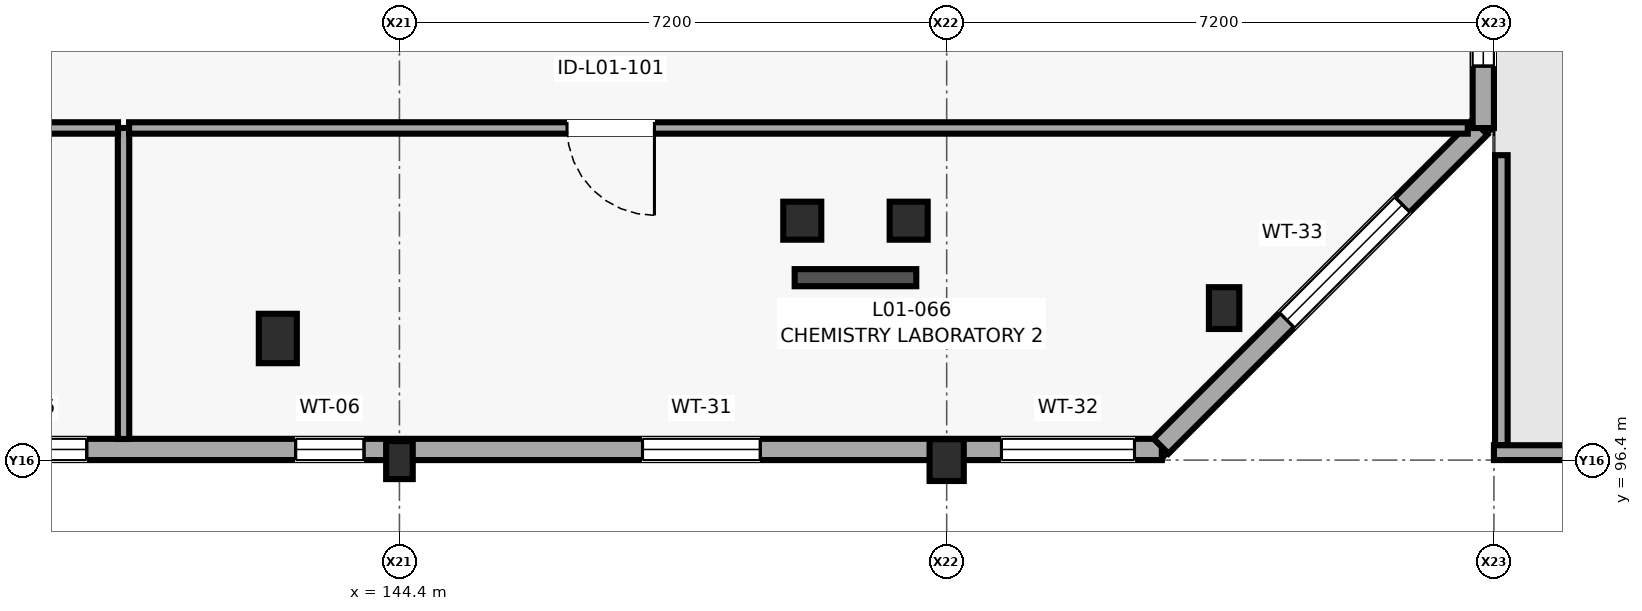
"""IFC4 building model, lengths in metres.
Left out: names, types, materials, properties, quantities, classifications, styles, units other than length and angle.
Written with IfcOpenShell. Run it as: python <this file> out.ifc"""

import sys

from ifc_helpers import new_model, si_unit, direction, frame, frame_2d, origin, origin_2d, place, context, subcontext, project, spatial, rectangle, extrude, element, fill, save


model = new_model("IFC4")
c1 = context("Model", 3, precision=1e-05, world=origin(), true_north=direction((0.0, 1.0)))
c2 = subcontext(c1, "Body", "Model", "MODEL_VIEW")
j1 = project(units=[si_unit("LENGTHUNIT", "METRE"), si_unit("PLANEANGLEUNIT", "RADIAN")], contexts=[c1])
p1 = place(None, origin())
s1 = spatial("IfcSite", under=j1, at=p1, CompositionType="ELEMENT")
p2 = place(p1, origin())
s2 = spatial("IfcBuilding", under=s1, at=p2, CompositionType="ELEMENT")
p3 = place(p2, frame((0.0, 0.0, 4.2)))
s3 = spatial("IfcBuildingStorey", under=s2, at=p3, CompositionType="ELEMENT", Elevation=4.2)
p4 = place(p3, frame((142.8, 98.0, 0.0), z_axis=(0.0, 0.0, 1.0), x_axis=(1.0, 0.0, 0.0)))
e1 = element("IfcColumn", 1, at=p4, inside=s3, PredefinedType="COLUMN", context=c2, shape_type="SweptSolid", body=[
    extrude(rectangle(XDim=0.5, YDim=0.65, at=origin_2d()), origin(), (0.0, 0.0, 1.0), 4.0),
])
p5 = place(p3, frame((144.4, 96.4, 0.0), z_axis=(0.0, 0.0, 1.0), x_axis=(1.0, 0.0, 0.0)))
e2 = element("IfcColumn", 2, at=p5, inside=s3, PredefinedType="PILASTER", context=c2, shape_type="SweptSolid", body=[
    extrude(rectangle(XDim=0.35, YDim=0.5, at=origin_2d()), origin(), (0.0, 0.0, 1.0), 4.0),
])
for number, where, z_axis, x_axis in (
    (3, (149.7, 99.55, 0.0), (0.0, 0.0, 1.0), (1.0, 0.0, 0.0)),
    (4, (151.1, 99.55, 0.0), (0.0, 0.0, 1.0), (1.0, 0.0, 0.0)),
):
    element("IfcColumn", number, at=place(p3, frame(where, z_axis=z_axis, x_axis=x_axis)), inside=s3, PredefinedType="COLUMN", context=c2, shape_type="SweptSolid", body=[
        extrude(rectangle(XDim=0.5, YDim=0.5, at=origin_2d()), origin(), (0.0, 0.0, 1.0), 4.0),
    ])
p6 = place(p3, frame((151.6, 96.4, 0.0), z_axis=(0.0, 0.0, 1.0), x_axis=(1.0, 0.0, 0.0)))
e5 = element("IfcColumn", 5, at=p6, inside=s3, PredefinedType="PILASTER", context=c2, shape_type="SweptSolid", body=[
    extrude(rectangle(XDim=0.45, YDim=0.55, at=origin_2d()), origin(), (0.0, 0.0, 1.0), 4.0),
])
p7 = place(p3, frame((155.25, 98.4, 0.0), z_axis=(0.0, 0.0, 1.0), x_axis=(1.0, 0.0, 0.0)))
e6 = element("IfcColumn", 6, at=p7, inside=s3, PredefinedType="COLUMN", context=c2, shape_type="SweptSolid", body=[
    extrude(rectangle(XDim=0.4, YDim=0.55, at=origin_2d()), origin(), (0.0, 0.0, 1.0), 4.0),
])
p8 = place(p3, frame((138.276, 96.54, 0.0), z_axis=(0.0, 0.0, 1.0), x_axis=(1.0, 0.0, 0.0)))
e7 = element("IfcWall", 7, at=p8, inside=s3, PredefinedType="SOLIDWALL", context=c2, shape_type="SweptSolid", body=[
    extrude(rectangle(XDim=16.155, YDim=0.28, at=frame_2d((8.078, 0.0))), origin(), (0.0, 0.0, 1.0), 3.015),
])
p9 = place(p8, frame((0.36, 0.0, 0.85)))
e8 = element("IfcOpeningElement", 8, at=p9, cuts=e7, PredefinedType="OPENING", context=c2, shape_type="SweptSolid", body=[
    extrude(rectangle(XDim=1.65, YDim=1.95, at=frame_2d((0.825, 0.975))), frame((0.0, 0.15, 0.0), z_axis=(0.0, -1.0, 0.0), x_axis=(1.0, 0.0, 0.0)), (0.0, 0.0, 1.0), 0.3),
])
p10 = place(p8, frame((4.758, 0.0, 1.05)))
e9 = element("IfcOpeningElement", 9, at=p10, cuts=e7, PredefinedType="OPENING", context=c2, shape_type="SweptSolid", body=[
    extrude(rectangle(XDim=0.9, YDim=1.5, at=frame_2d((0.45, 0.75))), frame((0.0, 0.15, 0.0), z_axis=(0.0, -1.0, 0.0), x_axis=(1.0, 0.0, 0.0)), (0.0, 0.0, 1.0), 0.3),
])
p11 = place(p8, frame((9.322, 0.0, 0.85)))
e10 = element("IfcOpeningElement", 10, at=p11, cuts=e7, PredefinedType="OPENING", context=c2, shape_type="SweptSolid", body=[
    extrude(rectangle(XDim=1.55, YDim=1.85, at=frame_2d((0.775, 0.925))), frame((0.0, 0.15, 0.0), z_axis=(0.0, -1.0, 0.0), x_axis=(1.0, 0.0, 0.0)), (0.0, 0.0, 1.0), 0.3),
])
p12 = place(p8, frame((14.045, 0.0, 0.75)))
e11 = element("IfcOpeningElement", 11, at=p12, cuts=e7, PredefinedType="OPENING", context=c2, shape_type="SweptSolid", body=[
    extrude(rectangle(XDim=1.75, YDim=2.05, at=frame_2d((0.875, 1.025))), frame((0.0, 0.15, 0.0), z_axis=(0.0, -1.0, 0.0), x_axis=(1.0, 0.0, 0.0)), (0.0, 0.0, 1.0), 0.3),
])
p13 = place(p3, frame((154.419, 96.584, 0.0), z_axis=(0.0, 0.0, 1.0), x_axis=(0.707106781187, 0.707106781187, 0.0)))
e12 = element("IfcWall", 12, at=p13, inside=s3, PredefinedType="SOLIDWALL", context=c2, shape_type="SweptSolid", body=[
    extrude(rectangle(XDim=5.936, YDim=0.28, at=frame_2d((2.968, 0.0))), origin(), (0.0, 0.0, 1.0), 3.78),
])
p14 = place(p13, frame((2.343, 0.0, 0.85)))
e13 = element("IfcOpeningElement", 13, at=p14, cuts=e12, PredefinedType="OPENING", context=c2, shape_type="SweptSolid", body=[
    extrude(rectangle(XDim=2.15, YDim=1.95, at=frame_2d((1.075, 0.975))), frame((0.0, 0.15, 0.0), z_axis=(0.0, -1.0, 0.0), x_axis=(1.0, 0.0, 0.0)), (0.0, 0.0, 1.0), 0.3),
])
p15 = place(p3, frame((158.66, 100.769, 0.0), z_axis=(0.0, 0.0, 1.0), x_axis=(0.0, 1.0, 0.0)))
e14 = element("IfcWall", 14, at=p15, inside=s3, PredefinedType="SOLIDWALL", context=c2, shape_type="SweptSolid", body=[
    extrude(rectangle(XDim=6.862, YDim=0.28, at=frame_2d((3.431, 0.0))), origin(), (0.0, 0.0, 1.0), 3.78),
])
p16 = place(p15, frame((0.815, 0.0, 0.85)))
e15 = element("IfcOpeningElement", 15, at=p16, cuts=e14, PredefinedType="OPENING", context=c2, shape_type="SweptSolid", body=[
    extrude(rectangle(XDim=1.8, YDim=1.8, at=frame_2d((0.9, 0.9))), frame((0.0, 0.15, 0.0), z_axis=(0.0, -1.0, 0.0), x_axis=(1.0, 0.0, 0.0)), (0.0, 0.0, 1.0), 0.3),
])
p17 = place(p15, frame((4.096, 0.0, 0.85)))
e16 = element("IfcOpeningElement", 16, at=p17, cuts=e14, PredefinedType="OPENING", context=c2, shape_type="SweptSolid", body=[
    extrude(rectangle(XDim=2.1, YDim=1.8, at=frame_2d((1.05, 0.9))), frame((0.0, 0.15, 0.0), z_axis=(0.0, -1.0, 0.0), x_axis=(1.0, 0.0, 0.0)), (0.0, 0.0, 1.0), 0.3),
])
p18 = place(p3, frame((158.898, 100.412, 0.0), z_axis=(0.0, 0.0, 1.0), x_axis=(0.0, -1.0, 0.0)))
e17 = element("IfcWall", 17, at=p18, inside=s3, PredefinedType="PARAPET", context=c2, shape_type="SweptSolid", body=[
    extrude(rectangle(XDim=3.816, YDim=0.165, at=frame_2d((1.908, 0.0))), origin(), (0.0, 0.0, 1.0), 1.12),
])
p19 = place(p3, frame((158.8, 96.498, 0.0), z_axis=(0.0, 0.0, 1.0), x_axis=(1.0, 0.0, 0.0)))
e18 = element("IfcWall", 18, at=p19, inside=s3, PredefinedType="PARAPET", context=c2, shape_type="SweptSolid", body=[
    extrude(rectangle(XDim=5.244, YDim=0.195, at=frame_2d((2.622, 0.0))), origin(), (0.0, 0.0, 1.0), 1.12),
])
p20 = place(p3, frame((149.6, 98.8, 0.0), z_axis=(0.0, 0.0, 1.0), x_axis=(1.0, 0.0, 0.0)))
e19 = element("IfcWall", 19, at=p20, inside=s3, PredefinedType="SHEAR", context=c2, shape_type="SweptSolid", body=[
    extrude(rectangle(XDim=1.6, YDim=0.225, at=frame_2d((0.8, 0.0))), origin(), (0.0, 0.0, 1.0), 3.72),
])
p21 = place(p3, frame((140.77, 96.678, 0.0), z_axis=(0.0, 0.0, 1.0), x_axis=(0.0, 1.0, 0.0)))
e20 = element("IfcWall", 20, at=p21, inside=s3, PredefinedType="PARTITIONING", context=c2, shape_type="SweptSolid", body=[
    extrude(rectangle(XDim=4.092, YDim=0.15, at=frame_2d((2.046, 0.0))), origin(), (0.0, 0.0, 1.0), 3.715),
])
p22 = place(p3, frame((140.697, 100.77, 0.0), z_axis=(0.0, 0.0, 1.0), x_axis=(-1.0, 0.0, 0.0)))
e21 = element("IfcWall", 21, at=p22, inside=s3, PredefinedType="PARTITIONING", context=c2, shape_type="SweptSolid", body=[
    extrude(rectangle(XDim=17.854, YDim=0.15, at=frame_2d((8.927, 0.0))), origin(), (0.0, 0.0, 1.0), 3.715),
])
p23 = place(p22, frame((8.352, 0.0, 0.0)))
e22 = element("IfcOpeningElement", 22, at=p23, cuts=e21, PredefinedType="OPENING", context=c2, shape_type="SweptSolid", body=[
    extrude(rectangle(XDim=1.15, YDim=2.2, at=frame_2d((0.575, 1.1))), frame((0.0, 0.085, 0.0), z_axis=(0.0, -1.0, 0.0), x_axis=(1.0, 0.0, 0.0)), (0.0, 0.0, 1.0), 0.17),
])
p24 = place(p3, frame((158.456, 100.77, 0.0), z_axis=(0.0, 0.0, 1.0), x_axis=(-1.0, 0.0, 0.0)))
e23 = element("IfcWall", 23, at=p24, inside=s3, PredefinedType="PARTITIONING", context=c2, shape_type="SweptSolid", body=[
    extrude(rectangle(XDim=17.613, YDim=0.15, at=frame_2d((8.807, 0.0))), origin(), (0.0, 0.0, 1.0), 3.715),
])
p25 = place(p24, frame((10.701, 0.0, 0.0)))
e24 = element("IfcOpeningElement", 24, at=p25, cuts=e23, PredefinedType="OPENING", context=c2, shape_type="SweptSolid", body=[
    extrude(rectangle(XDim=1.15, YDim=2.2, at=frame_2d((0.575, 1.1))), frame((0.0, 0.085, 0.0), z_axis=(0.0, -1.0, 0.0), x_axis=(1.0, 0.0, 0.0)), (0.0, 0.0, 1.0), 0.17),
])
p26 = place(p9, origin())
e25 = element("IfcWindow", 25, at=p26, inside=s3, PartitioningType="SINGLE_PANEL", PredefinedType="WINDOW", context=c2, shape_type="SweptSolid", body=[
    extrude(rectangle(XDim=1.65, YDim=1.95, at=frame_2d((0.825, 0.975))), frame((0.0, 0.03, 0.0), z_axis=(0.0, -1.0, 0.0), x_axis=(1.0, 0.0, 0.0)), (0.0, 0.0, 1.0), 0.06),
])
fill(e8, e25)
p27 = place(p10, origin())
e26 = element("IfcWindow", 26, at=p27, inside=s3, PartitioningType="SINGLE_PANEL", PredefinedType="WINDOW", context=c2, shape_type="SweptSolid", body=[
    extrude(rectangle(XDim=0.9, YDim=1.5, at=frame_2d((0.45, 0.75))), frame((0.0, 0.03, 0.0), z_axis=(0.0, -1.0, 0.0), x_axis=(1.0, 0.0, 0.0)), (0.0, 0.0, 1.0), 0.06),
])
fill(e9, e26)
p28 = place(p11, origin())
e27 = element("IfcWindow", 27, at=p28, inside=s3, PartitioningType="SINGLE_PANEL", PredefinedType="WINDOW", context=c2, shape_type="SweptSolid", body=[
    extrude(rectangle(XDim=1.55, YDim=1.85, at=frame_2d((0.775, 0.925))), frame((0.0, 0.03, 0.0), z_axis=(0.0, -1.0, 0.0), x_axis=(1.0, 0.0, 0.0)), (0.0, 0.0, 1.0), 0.06),
])
fill(e10, e27)
p29 = place(p12, origin())
e28 = element("IfcWindow", 28, at=p29, inside=s3, PartitioningType="SINGLE_PANEL", PredefinedType="WINDOW", context=c2, shape_type="SweptSolid", body=[
    extrude(rectangle(XDim=1.75, YDim=2.05, at=frame_2d((0.875, 1.025))), frame((0.0, 0.03, 0.0), z_axis=(0.0, -1.0, 0.0), x_axis=(1.0, 0.0, 0.0)), (0.0, 0.0, 1.0), 0.06),
])
fill(e11, e28)
p30 = place(p14, origin())
e29 = element("IfcWindow", 29, at=p30, inside=s3, PartitioningType="SINGLE_PANEL", PredefinedType="WINDOW", context=c2, shape_type="SweptSolid", body=[
    extrude(rectangle(XDim=2.15, YDim=1.95, at=frame_2d((1.075, 0.975))), frame((0.0, 0.03, 0.0), z_axis=(0.0, -1.0, 0.0), x_axis=(1.0, 0.0, 0.0)), (0.0, 0.0, 1.0), 0.06),
])
fill(e13, e29)
p31 = place(p16, origin())
e30 = element("IfcWindow", 30, at=p31, inside=s3, PartitioningType="SINGLE_PANEL", PredefinedType="WINDOW", context=c2, shape_type="SweptSolid", body=[
    extrude(rectangle(XDim=1.8, YDim=1.8, at=frame_2d((0.9, 0.9))), frame((0.0, 0.03, 0.0), z_axis=(0.0, -1.0, 0.0), x_axis=(1.0, 0.0, 0.0)), (0.0, 0.0, 1.0), 0.06),
])
fill(e15, e30)
p32 = place(p25, origin())
e31 = element("IfcDoor", 31, at=p32, inside=s3, OperationType="SINGLE_SWING_LEFT", PredefinedType="DOOR", context=c2, shape_type="SweptSolid", body=[
    extrude(rectangle(XDim=1.15, YDim=2.2, at=frame_2d((0.575, 1.1))), frame((0.0, 0.025, 0.0), z_axis=(0.0, -1.0, 0.0), x_axis=(1.0, 0.0, 0.0)), (0.0, 0.0, 1.0), 0.05),
])
fill(e24, e31)
save(model, sys.argv[1])
